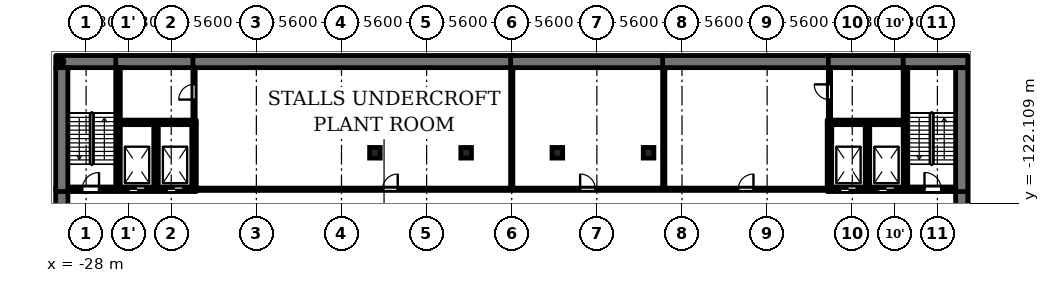
"""IFC4 building model, lengths in metres.
Left out: names, types, materials, properties, quantities, classifications, styles, units other than length and angle.
Written with IfcOpenShell. Run it as: python <this file> out.ifc"""

import sys

from ifc_helpers import new_model, si_unit, direction, frame, frame_2d, origin, origin_2d, place, context, subcontext, project, spatial, rectangle, extrude, element, fill, save


model = new_model("IFC4")
c1 = context("Model", 3, precision=1e-05, world=origin(), true_north=direction((0.0, 1.0)))
c2 = subcontext(c1, "Body", "Model", "MODEL_VIEW")
j1 = project(units=[si_unit("LENGTHUNIT", "METRE"), si_unit("PLANEANGLEUNIT", "RADIAN")], contexts=[c1])
p1 = place(None, origin())
s1 = spatial("IfcSite", under=j1, at=p1, CompositionType="ELEMENT")
p2 = place(p1, origin())
s2 = spatial("IfcBuilding", under=s1, at=p2, CompositionType="ELEMENT")
p3 = place(p2, frame((0.0, 0.0, -4.5)))
s3 = spatial("IfcBuildingStorey", under=s2, at=p3, CompositionType="ELEMENT", Elevation=-4.5)
for number, where, z_axis, x_axis in (
    (1, (-9.0, -118.8, 0.0), (0.0, 0.0, 1.0), (1.0, 0.0, 0.0)),
    (2, (-3.0, -118.8, 0.0), (0.0, 0.0, 1.0), (1.0, 0.0, 0.0)),
    (3, (3.0, -118.8, 0.0), (0.0, 0.0, 1.0), (1.0, 0.0, 0.0)),
    (4, (9.0, -118.8, 0.0), (0.0, 0.0, 1.0), (1.0, 0.0, 0.0)),
):
    element("IfcColumn", number, at=place(p3, frame(where, z_axis=z_axis, x_axis=x_axis)), inside=s3, PredefinedType="COLUMN", context=c2, shape_type="SweptSolid", body=[
        extrude(rectangle(XDim=0.7, YDim=0.7, at=origin_2d()), origin(), (0.0, 0.0, 1.0), 4.15),
    ])
p4 = place(p3, frame((-29.2, -121.2, 0.0), z_axis=(0.0, 0.0, 1.0), x_axis=(1.0, 0.0, 0.0)))
e5 = element("IfcWall", 5, at=p4, inside=s3, PredefinedType="SOLIDWALL", context=c2, shape_type="SweptSolid", body=[
    extrude(rectangle(XDim=8.45, YDim=0.3, at=frame_2d((4.225, 0.0))), origin(), (0.0, 0.0, 1.0), 4.15),
])
p5 = place(p4, frame((4.0, 0.0, 0.0)))
e6 = element("IfcOpeningElement", 6, at=p5, cuts=e5, PredefinedType="OPENING", context=c2, shape_type="SweptSolid", body=[
    extrude(rectangle(XDim=1.1, YDim=2.1, at=frame_2d((0.55, 1.05))), frame((0.0, 0.16, 0.0), z_axis=(0.0, -1.0, 0.0), x_axis=(1.0, 0.0, 0.0)), (0.0, 0.0, 1.0), 0.32),
])
p6 = place(p4, frame((6.5, 0.0, 0.0)))
e7 = element("IfcOpeningElement", 7, at=p6, cuts=e5, PredefinedType="OPENING", context=c2, shape_type="SweptSolid", body=[
    extrude(rectangle(XDim=1.1, YDim=2.1, at=frame_2d((0.55, 1.05))), frame((0.0, 0.16, 0.0), z_axis=(0.0, -1.0, 0.0), x_axis=(1.0, 0.0, 0.0)), (0.0, 0.0, 1.0), 0.32),
])
p7 = place(p4, frame((0.95, 0.0, 0.0)))
e8 = element("IfcOpeningElement", 8, at=p7, cuts=e5, PredefinedType="OPENING", context=c2, shape_type="SweptSolid", body=[
    extrude(rectangle(XDim=1.1, YDim=2.1, at=frame_2d((0.55, 1.05))), frame((0.0, 0.16, 0.0), z_axis=(0.0, -1.0, 0.0), x_axis=(1.0, 0.0, 0.0)), (0.0, 0.0, 1.0), 0.32),
])
p8 = place(p3, frame((-20.75, -121.2, 0.0), z_axis=(0.0, 0.0, 1.0), x_axis=(1.0, 0.0, 0.0)))
e9 = element("IfcWall", 9, at=p8, inside=s3, PredefinedType="PARTITIONING", context=c2, shape_type="SweptSolid", body=[
    extrude(rectangle(XDim=41.5, YDim=0.15, at=frame_2d((20.75, 0.0))), origin(), (0.0, 0.0, 1.0), 4.15),
])
p9 = place(p8, frame((12.25, 0.0, 0.0)))
e10 = element("IfcOpeningElement", 10, at=p9, cuts=e9, PredefinedType="OPENING", context=c2, shape_type="SweptSolid", body=[
    extrude(rectangle(XDim=1.0, YDim=2.1, at=frame_2d((0.5, 1.05))), frame((0.0, 0.085, 0.0), z_axis=(0.0, -1.0, 0.0), x_axis=(1.0, 0.0, 0.0)), (0.0, 0.0, 1.0), 0.17),
])
p10 = place(p8, frame((25.25, 0.0, 0.0)))
e11 = element("IfcOpeningElement", 11, at=p10, cuts=e9, PredefinedType="OPENING", context=c2, shape_type="SweptSolid", body=[
    extrude(rectangle(XDim=1.0, YDim=2.1, at=frame_2d((0.5, 1.05))), frame((0.0, 0.085, 0.0), z_axis=(0.0, -1.0, 0.0), x_axis=(1.0, 0.0, 0.0)), (0.0, 0.0, 1.0), 0.17),
])
p11 = place(p8, frame((35.65, 0.0, 0.0)))
e12 = element("IfcOpeningElement", 12, at=p11, cuts=e9, PredefinedType="OPENING", context=c2, shape_type="SweptSolid", body=[
    extrude(rectangle(XDim=1.0, YDim=2.1, at=frame_2d((0.5, 1.05))), frame((0.0, 0.085, 0.0), z_axis=(0.0, -1.0, 0.0), x_axis=(1.0, 0.0, 0.0)), (0.0, 0.0, 1.0), 0.17),
])
p12 = place(p3, frame((20.75, -121.2, 0.0), z_axis=(0.0, 0.0, 1.0), x_axis=(1.0, 0.0, 0.0)))
e13 = element("IfcWall", 13, at=p12, inside=s3, PredefinedType="SOLIDWALL", context=c2, shape_type="SweptSolid", body=[
    extrude(rectangle(XDim=8.45, YDim=0.3, at=frame_2d((4.225, 0.0))), origin(), (0.0, 0.0, 1.0), 4.15),
])
p13 = place(p12, frame((0.85, 0.0, 0.0)))
e14 = element("IfcOpeningElement", 14, at=p13, cuts=e13, PredefinedType="OPENING", context=c2, shape_type="SweptSolid", body=[
    extrude(rectangle(XDim=1.1, YDim=2.1, at=frame_2d((0.55, 1.05))), frame((0.0, 0.16, 0.0), z_axis=(0.0, -1.0, 0.0), x_axis=(1.0, 0.0, 0.0)), (0.0, 0.0, 1.0), 0.32),
])
p14 = place(p12, frame((3.35, 0.0, 0.0)))
e15 = element("IfcOpeningElement", 15, at=p14, cuts=e13, PredefinedType="OPENING", context=c2, shape_type="SweptSolid", body=[
    extrude(rectangle(XDim=1.1, YDim=2.1, at=frame_2d((0.55, 1.05))), frame((0.0, 0.16, 0.0), z_axis=(0.0, -1.0, 0.0), x_axis=(1.0, 0.0, 0.0)), (0.0, 0.0, 1.0), 0.32),
])
p15 = place(p12, frame((6.4, 0.0, 0.0)))
e16 = element("IfcOpeningElement", 16, at=p15, cuts=e13, PredefinedType="OPENING", context=c2, shape_type="SweptSolid", body=[
    extrude(rectangle(XDim=1.1, YDim=2.1, at=frame_2d((0.55, 1.05))), frame((0.0, 0.16, 0.0), z_axis=(0.0, -1.0, 0.0), x_axis=(1.0, 0.0, 0.0)), (0.0, 0.0, 1.0), 0.32),
])
for number, where, z_axis, x_axis in (
    (17, (-25.75, -116.8, 0.0), (0.0, 0.0, 1.0), (1.0, 0.0, 0.0)),
    (18, (20.75, -116.8, 0.0), (0.0, 0.0, 1.0), (1.0, 0.0, 0.0)),
):
    element("IfcWall", number, at=place(p3, frame(where, z_axis=z_axis, x_axis=x_axis)), inside=s3, PredefinedType="SOLIDWALL", context=c2, shape_type="SweptSolid", body=[
        extrude(rectangle(XDim=5.0, YDim=0.3, at=frame_2d((2.5, 0.0))), origin(), (0.0, 0.0, 1.0), 4.15),
    ])
p16 = place(p3, frame((-30.0, -112.8, 0.0), z_axis=(0.0, 0.0, 1.0), x_axis=(1.0, 0.0, 0.0)))
e19 = element("IfcWall", 19, at=p16, inside=s3, PredefinedType="SOLIDWALL", context=c2, shape_type="SweptSolid", body=[
    extrude(rectangle(XDim=4.25, YDim=0.8, at=frame_2d((2.125, 0.0))), origin(), (0.0, 0.0, 1.0), 4.15),
])
p17 = place(p3, frame((-26.05, -112.8, 0.0), z_axis=(0.0, 0.0, 1.0), x_axis=(1.0, 0.0, 0.0)))
e20 = element("IfcWall", 20, at=p17, inside=s3, PredefinedType="SOLIDWALL", context=c2, shape_type="SweptSolid", body=[
    extrude(rectangle(XDim=5.225, YDim=0.8, at=frame_2d((2.612, 0.0))), origin(), (0.0, 0.0, 1.0), 4.15),
])
p18 = place(p3, frame((-20.975, -112.8, 0.0), z_axis=(0.0, 0.0, 1.0), x_axis=(1.0, 0.0, 0.0)))
e21 = element("IfcWall", 21, at=p18, inside=s3, PredefinedType="SOLIDWALL", context=c2, shape_type="SweptSolid", body=[
    extrude(rectangle(XDim=21.05, YDim=0.8, at=frame_2d((10.525, 0.0))), origin(), (0.0, 0.0, 1.0), 4.15),
])
p19 = place(p3, frame((-0.075, -112.8, 0.0), z_axis=(0.0, 0.0, 1.0), x_axis=(1.0, 0.0, 0.0)))
e22 = element("IfcWall", 22, at=p19, inside=s3, PredefinedType="SOLIDWALL", context=c2, shape_type="SweptSolid", body=[
    extrude(rectangle(XDim=10.15, YDim=0.8, at=frame_2d((5.075, 0.0))), origin(), (0.0, 0.0, 1.0), 4.15),
])
p20 = place(p3, frame((9.925, -112.8, 0.0), z_axis=(0.0, 0.0, 1.0), x_axis=(1.0, 0.0, 0.0)))
e23 = element("IfcWall", 23, at=p20, inside=s3, PredefinedType="SOLIDWALL", context=c2, shape_type="SweptSolid", body=[
    extrude(rectangle(XDim=11.05, YDim=0.8, at=frame_2d((5.525, 0.0))), origin(), (0.0, 0.0, 1.0), 4.15),
])
p21 = place(p3, frame((20.825, -112.8, 0.0), z_axis=(0.0, 0.0, 1.0), x_axis=(1.0, 0.0, 0.0)))
e24 = element("IfcWall", 24, at=p21, inside=s3, PredefinedType="SOLIDWALL", context=c2, shape_type="SweptSolid", body=[
    extrude(rectangle(XDim=5.225, YDim=0.8, at=frame_2d((2.612, 0.0))), origin(), (0.0, 0.0, 1.0), 4.15),
])
p22 = place(p3, frame((25.75, -112.8, 0.0), z_axis=(0.0, 0.0, 1.0), x_axis=(1.0, 0.0, 0.0)))
e25 = element("IfcWall", 25, at=p22, inside=s3, PredefinedType="SOLIDWALL", context=c2, shape_type="SweptSolid", body=[
    extrude(rectangle(XDim=4.25, YDim=0.8, at=frame_2d((2.125, 0.0))), origin(), (0.0, 0.0, 1.0), 4.15),
])
p23 = place(p3, frame((-29.6, -124.925, 0.0), z_axis=(0.0, 0.0, 1.0), x_axis=(0.0, 1.0, 0.0)))
e26 = element("IfcWall", 26, at=p23, inside=s3, PredefinedType="SOLIDWALL", context=c2, shape_type="SweptSolid", body=[
    extrude(rectangle(XDim=3.875, YDim=0.8, at=frame_2d((1.938, 0.0))), origin(), (0.0, 0.0, 1.0), 4.15),
])
p24 = place(p3, frame((-29.6, -121.35, 0.0), z_axis=(0.0, 0.0, 1.0), x_axis=(0.0, 1.0, 0.0)))
e27 = element("IfcWall", 27, at=p24, inside=s3, PredefinedType="SOLIDWALL", context=c2, shape_type="SweptSolid", body=[
    extrude(rectangle(XDim=8.15, YDim=0.8, at=frame_2d((4.075, 0.0))), origin(), (0.0, 0.0, 1.0), 4.15),
])
p25 = place(p3, frame((-25.9, -121.05, 0.0), z_axis=(0.0, 0.0, 1.0), x_axis=(0.0, 1.0, 0.0)))
e28 = element("IfcWall", 28, at=p25, inside=s3, PredefinedType="SOLIDWALL", context=c2, shape_type="SweptSolid", body=[
    extrude(rectangle(XDim=7.85, YDim=0.3, at=frame_2d((3.925, 0.0))), origin(), (0.0, 0.0, 1.0), 4.15),
])
p26 = place(p3, frame((-23.4, -121.05, 0.0), z_axis=(0.0, 0.0, 1.0), x_axis=(0.0, 1.0, 0.0)))
e29 = element("IfcWall", 29, at=p26, inside=s3, PredefinedType="SOLIDWALL", context=c2, shape_type="SweptSolid", body=[
    extrude(rectangle(XDim=4.1, YDim=0.3, at=frame_2d((2.05, 0.0))), origin(), (0.0, 0.0, 1.0), 4.15),
])
p27 = place(p3, frame((-20.9, -121.125, 0.0), z_axis=(0.0, 0.0, 1.0), x_axis=(0.0, 1.0, 0.0)))
e30 = element("IfcWall", 30, at=p27, inside=s3, PredefinedType="SOLIDWALL", context=c2, shape_type="SweptSolid", body=[
    extrude(rectangle(XDim=4.175, YDim=0.3, at=frame_2d((2.087, 0.0))), origin(), (0.0, 0.0, 1.0), 4.15),
])
p28 = place(p3, frame((-20.9, -116.65, 0.0), z_axis=(0.0, 0.0, 1.0), x_axis=(0.0, 1.0, 0.0)))
e31 = element("IfcWall", 31, at=p28, inside=s3, PredefinedType="PARTITIONING", context=c2, shape_type="SweptSolid", body=[
    extrude(rectangle(XDim=3.45, YDim=0.15, at=frame_2d((1.725, 0.0))), origin(), (0.0, 0.0, 1.0), 4.15),
])
p29 = place(p28, frame((1.35, 0.0, 0.0)))
e32 = element("IfcOpeningElement", 32, at=p29, cuts=e31, PredefinedType="OPENING", context=c2, shape_type="SweptSolid", body=[
    extrude(rectangle(XDim=1.0, YDim=2.1, at=frame_2d((0.5, 1.05))), frame((0.0, 0.085, 0.0), z_axis=(0.0, -1.0, 0.0), x_axis=(1.0, 0.0, 0.0)), (0.0, 0.0, 1.0), 0.17),
])
for number, where, z_axis, x_axis in (
    (33, (0.0, -121.125, 0.0), (0.0, 0.0, 1.0), (0.0, 1.0, 0.0)),
    (34, (10.0, -121.125, 0.0), (0.0, 0.0, 1.0), (0.0, 1.0, 0.0)),
):
    element("IfcWall", number, at=place(p3, frame(where, z_axis=z_axis, x_axis=x_axis)), inside=s3, PredefinedType="PARTITIONING", context=c2, shape_type="SweptSolid", body=[
        extrude(rectangle(XDim=7.925, YDim=0.15, at=frame_2d((3.962, 0.0))), origin(), (0.0, 0.0, 1.0), 4.15),
    ])
p30 = place(p3, frame((20.9, -121.125, 0.0), z_axis=(0.0, 0.0, 1.0), x_axis=(0.0, 1.0, 0.0)))
e35 = element("IfcWall", 35, at=p30, inside=s3, PredefinedType="SOLIDWALL", context=c2, shape_type="SweptSolid", body=[
    extrude(rectangle(XDim=4.175, YDim=0.3, at=frame_2d((2.087, 0.0))), origin(), (0.0, 0.0, 1.0), 4.15),
])
p31 = place(p3, frame((20.9, -116.65, 0.0), z_axis=(0.0, 0.0, 1.0), x_axis=(0.0, 1.0, 0.0)))
e36 = element("IfcWall", 36, at=p31, inside=s3, PredefinedType="PARTITIONING", context=c2, shape_type="SweptSolid", body=[
    extrude(rectangle(XDim=3.45, YDim=0.15, at=frame_2d((1.725, 0.0))), origin(), (0.0, 0.0, 1.0), 4.15),
])
p32 = place(p31, frame((1.35, 0.0, 0.0)))
e37 = element("IfcOpeningElement", 37, at=p32, cuts=e36, PredefinedType="OPENING", context=c2, shape_type="SweptSolid", body=[
    extrude(rectangle(XDim=1.0, YDim=2.1, at=frame_2d((0.5, 1.05))), frame((0.0, 0.085, 0.0), z_axis=(0.0, -1.0, 0.0), x_axis=(1.0, 0.0, 0.0)), (0.0, 0.0, 1.0), 0.17),
])
p33 = place(p3, frame((23.4, -121.05, 0.0), z_axis=(0.0, 0.0, 1.0), x_axis=(0.0, 1.0, 0.0)))
e38 = element("IfcWall", 38, at=p33, inside=s3, PredefinedType="SOLIDWALL", context=c2, shape_type="SweptSolid", body=[
    extrude(rectangle(XDim=4.1, YDim=0.3, at=frame_2d((2.05, 0.0))), origin(), (0.0, 0.0, 1.0), 4.15),
])
p34 = place(p3, frame((25.9, -121.05, 0.0), z_axis=(0.0, 0.0, 1.0), x_axis=(0.0, 1.0, 0.0)))
e39 = element("IfcWall", 39, at=p34, inside=s3, PredefinedType="SOLIDWALL", context=c2, shape_type="SweptSolid", body=[
    extrude(rectangle(XDim=7.85, YDim=0.3, at=frame_2d((3.925, 0.0))), origin(), (0.0, 0.0, 1.0), 4.15),
])
p35 = place(p3, frame((29.6, -121.05, 0.0), z_axis=(0.0, 0.0, 1.0), x_axis=(0.0, -1.0, 0.0)))
e40 = element("IfcWall", 40, at=p35, inside=s3, PredefinedType="SOLIDWALL", context=c2, shape_type="SweptSolid", body=[
    extrude(rectangle(XDim=3.875, YDim=0.8, at=frame_2d((1.938, 0.0))), origin(), (0.0, 0.0, 1.0), 4.15),
])
p36 = place(p3, frame((29.6, -113.2, 0.0), z_axis=(0.0, 0.0, 1.0), x_axis=(0.0, -1.0, 0.0)))
e41 = element("IfcWall", 41, at=p36, inside=s3, PredefinedType="SOLIDWALL", context=c2, shape_type="SweptSolid", body=[
    extrude(rectangle(XDim=8.15, YDim=0.8, at=frame_2d((4.075, 0.0))), origin(), (0.0, 0.0, 1.0), 4.15),
])
p37 = place(p5, origin())
e42 = element("IfcDoor", 42, at=p37, inside=s3, OperationType="DOUBLE_DOOR_SLIDING", PredefinedType="DOOR", context=c2, shape_type="SweptSolid", body=[
    extrude(rectangle(XDim=1.1, YDim=2.1, at=frame_2d((0.55, 1.05))), frame((0.0, 0.025, 0.0), z_axis=(0.0, -1.0, 0.0), x_axis=(1.0, 0.0, 0.0)), (0.0, 0.0, 1.0), 0.05),
])
fill(e6, e42)
p38 = place(p6, origin())
e43 = element("IfcDoor", 43, at=p38, inside=s3, OperationType="DOUBLE_DOOR_SLIDING", PredefinedType="DOOR", context=c2, shape_type="SweptSolid", body=[
    extrude(rectangle(XDim=1.1, YDim=2.1, at=frame_2d((0.55, 1.05))), frame((0.0, 0.025, 0.0), z_axis=(0.0, -1.0, 0.0), x_axis=(1.0, 0.0, 0.0)), (0.0, 0.0, 1.0), 0.05),
])
fill(e7, e43)
p39 = place(p13, origin())
e44 = element("IfcDoor", 44, at=p39, inside=s3, OperationType="DOUBLE_DOOR_SLIDING", PredefinedType="DOOR", context=c2, shape_type="SweptSolid", body=[
    extrude(rectangle(XDim=1.1, YDim=2.1, at=frame_2d((0.55, 1.05))), frame((0.0, 0.025, 0.0), z_axis=(0.0, -1.0, 0.0), x_axis=(1.0, 0.0, 0.0)), (0.0, 0.0, 1.0), 0.05),
])
fill(e14, e44)
p40 = place(p14, origin())
e45 = element("IfcDoor", 45, at=p40, inside=s3, OperationType="DOUBLE_DOOR_SLIDING", PredefinedType="DOOR", context=c2, shape_type="SweptSolid", body=[
    extrude(rectangle(XDim=1.1, YDim=2.1, at=frame_2d((0.55, 1.05))), frame((0.0, 0.025, 0.0), z_axis=(0.0, -1.0, 0.0), x_axis=(1.0, 0.0, 0.0)), (0.0, 0.0, 1.0), 0.05),
])
fill(e15, e45)
p41 = place(p7, origin())
e46 = element("IfcDoor", 46, at=p41, inside=s3, OperationType="SINGLE_SWING_RIGHT", PredefinedType="DOOR", context=c2, shape_type="SweptSolid", body=[
    extrude(rectangle(XDim=1.1, YDim=2.1, at=frame_2d((0.55, 1.05))), frame((0.0, 0.025, 0.0), z_axis=(0.0, -1.0, 0.0), x_axis=(1.0, 0.0, 0.0)), (0.0, 0.0, 1.0), 0.05),
])
fill(e8, e46)
p42 = place(p15, origin())
e47 = element("IfcDoor", 47, at=p42, inside=s3, OperationType="SINGLE_SWING_LEFT", PredefinedType="DOOR", context=c2, shape_type="SweptSolid", body=[
    extrude(rectangle(XDim=1.1, YDim=2.1, at=frame_2d((0.55, 1.05))), frame((0.0, 0.025, 0.0), z_axis=(0.0, -1.0, 0.0), x_axis=(1.0, 0.0, 0.0)), (0.0, 0.0, 1.0), 0.05),
])
fill(e16, e47)
p43 = place(p9, origin())
e48 = element("IfcDoor", 48, at=p43, inside=s3, OperationType="SINGLE_SWING_RIGHT", PredefinedType="DOOR", context=c2, shape_type="SweptSolid", body=[
    extrude(rectangle(XDim=1.0, YDim=2.1, at=frame_2d((0.5, 1.05))), frame((0.0, 0.025, 0.0), z_axis=(0.0, -1.0, 0.0), x_axis=(1.0, 0.0, 0.0)), (0.0, 0.0, 1.0), 0.05),
])
fill(e10, e48)
p44 = place(p10, origin())
e49 = element("IfcDoor", 49, at=p44, inside=s3, OperationType="SINGLE_SWING_LEFT", PredefinedType="DOOR", context=c2, shape_type="SweptSolid", body=[
    extrude(rectangle(XDim=1.0, YDim=2.1, at=frame_2d((0.5, 1.05))), frame((0.0, 0.025, 0.0), z_axis=(0.0, -1.0, 0.0), x_axis=(1.0, 0.0, 0.0)), (0.0, 0.0, 1.0), 0.05),
])
fill(e11, e49)
p45 = place(p11, origin())
e50 = element("IfcDoor", 50, at=p45, inside=s3, OperationType="SINGLE_SWING_RIGHT", PredefinedType="DOOR", context=c2, shape_type="SweptSolid", body=[
    extrude(rectangle(XDim=1.0, YDim=2.1, at=frame_2d((0.5, 1.05))), frame((0.0, 0.025, 0.0), z_axis=(0.0, -1.0, 0.0), x_axis=(1.0, 0.0, 0.0)), (0.0, 0.0, 1.0), 0.05),
])
fill(e12, e50)
p46 = place(p29, origin())
e51 = element("IfcDoor", 51, at=p46, inside=s3, OperationType="SINGLE_SWING_LEFT", PredefinedType="DOOR", context=c2, shape_type="SweptSolid", body=[
    extrude(rectangle(XDim=1.0, YDim=2.1, at=frame_2d((0.5, 1.05))), frame((0.0, 0.025, 0.0), z_axis=(0.0, -1.0, 0.0), x_axis=(1.0, 0.0, 0.0)), (0.0, 0.0, 1.0), 0.05),
])
fill(e32, e51)
p47 = place(p32, origin())
e52 = element("IfcDoor", 52, at=p47, inside=s3, OperationType="SINGLE_SWING_RIGHT", PredefinedType="DOOR", context=c2, shape_type="SweptSolid", body=[
    extrude(rectangle(XDim=1.0, YDim=2.1, at=frame_2d((0.5, 1.05))), frame((0.0, 0.025, 0.0), z_axis=(0.0, -1.0, 0.0), x_axis=(1.0, 0.0, 0.0)), (0.0, 0.0, 1.0), 0.05),
])
fill(e37, e52)
save(model, sys.argv[1])
